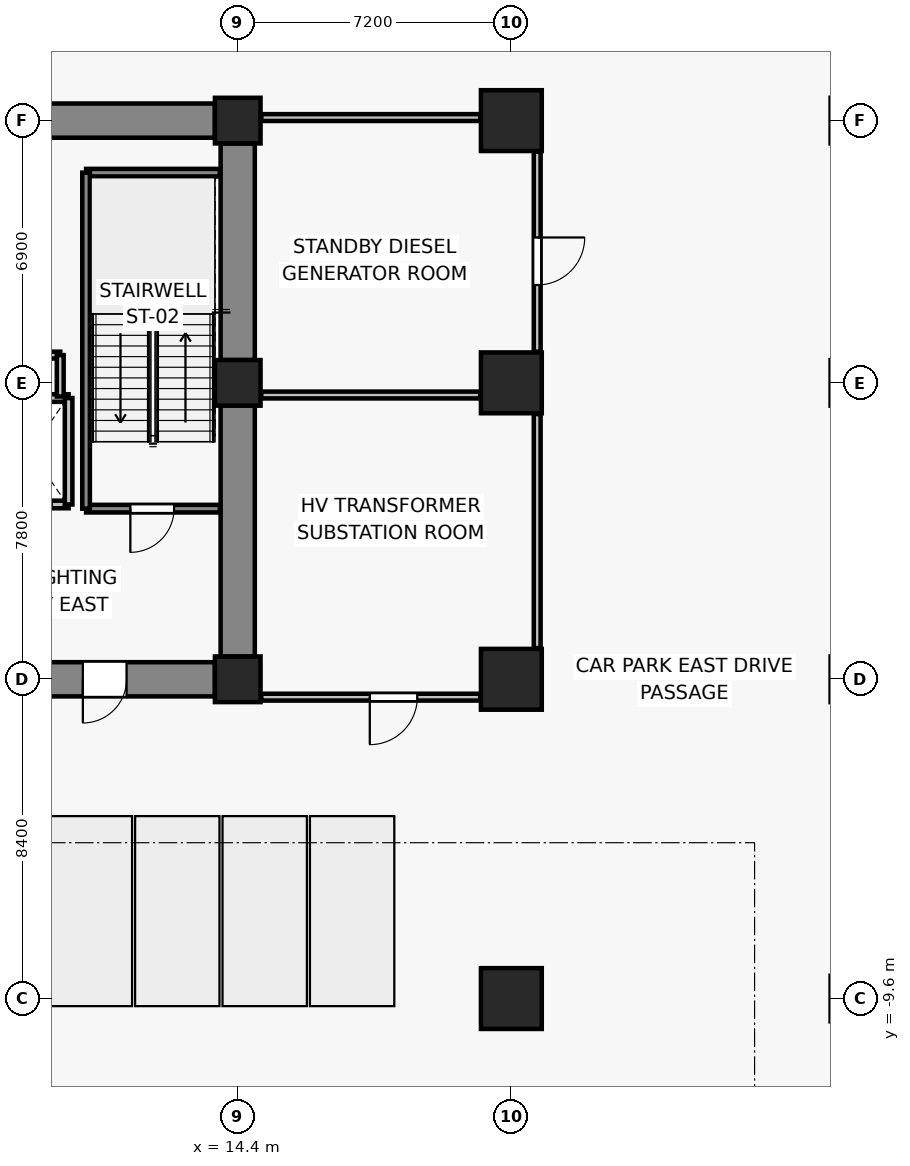
"""IFC4 building model, lengths in metres.
Left out: names, types, materials, properties, quantities, classifications, styles, units other than length and angle.
Written with IfcOpenShell. Run it as: python <this file> out.ifc"""

import sys

from ifc_helpers import new_model, si_unit, direction, frame, frame_2d, origin, origin_2d, place, context, subcontext, project, spatial, rectangle, extrude, source, transform, mapped, element, fill, save


model = new_model("IFC4")
c1 = context("Model", 3, precision=1e-05, world=origin(), true_north=direction((0.0, 1.0)))
c2 = subcontext(c1, "Body", "Model", "MODEL_VIEW")
j1 = project(units=[si_unit("LENGTHUNIT", "METRE"), si_unit("PLANEANGLEUNIT", "RADIAN")], contexts=[c1])
p1 = place(None, origin())
s1 = spatial("IfcSite", under=j1, at=p1, CompositionType="ELEMENT")
p2 = place(p1, origin())
s2 = spatial("IfcBuilding", under=s1, at=p2, CompositionType="ELEMENT")
p3 = place(p2, frame((0.0, 0.0, -8.8)))
s3 = spatial("IfcBuildingStorey", under=s2, at=p3, CompositionType="ELEMENT", Elevation=-8.8)
for number, where, z_axis, x_axis in (
    (1, (14.4, -1.2, 0.0), (0.0, 0.0, 1.0), (1.0, 0.0, 0.0)),
    (2, (14.4, 6.6, 0.0), (0.0, 0.0, 1.0), (1.0, 0.0, 0.0)),
    (3, (14.4, 13.5, 0.0), (0.0, 0.0, 1.0), (1.0, 0.0, 0.0)),
):
    element("IfcColumn", number, at=place(p3, frame(where, z_axis=z_axis, x_axis=x_axis)), inside=s3, PredefinedType="COLUMN", context=c2, shape_type="SweptSolid", body=[
        extrude(rectangle(XDim=1.2, YDim=1.2, at=origin_2d()), origin(), (0.0, 0.0, 1.0), 4.4),
    ])
for number, where, z_axis, x_axis in (
    (4, (21.6, -9.6, 0.0), (0.0, 0.0, 1.0), (1.0, 0.0, 0.0)),
    (5, (21.6, -1.2, 0.0), (0.0, 0.0, 1.0), (1.0, 0.0, 0.0)),
    (6, (21.6, 6.6, 0.0), (0.0, 0.0, 1.0), (1.0, 0.0, 0.0)),
    (7, (21.6, 13.5, 0.0), (0.0, 0.0, 1.0), (1.0, 0.0, 0.0)),
):
    element("IfcColumn", number, at=place(p3, frame(where, z_axis=z_axis, x_axis=x_axis)), inside=s3, PredefinedType="COLUMN", context=c2, shape_type="SweptSolid", body=[
        extrude(rectangle(XDim=1.6, YDim=1.6, at=origin_2d()), origin(), (0.0, 0.0, 1.0), 4.4),
    ])
p4 = place(p3, frame((7.8, 13.5, 0.0), z_axis=(0.0, 0.0, 1.0), x_axis=(1.0, 0.0, 0.0)))
e8 = element("IfcWall", 8, at=p4, inside=s3, PredefinedType="SHEAR", context=c2, shape_type="SweptSolid", body=[
    extrude(rectangle(XDim=6.0, YDim=0.9, at=frame_2d((3.0, 0.0))), origin(), (0.0, 0.0, 1.0), 4.12),
])
p5 = place(p3, frame((14.4, -0.6, 0.0), z_axis=(0.0, 0.0, 1.0), x_axis=(0.0, 1.0, 0.0)))
e9 = element("IfcWall", 9, at=p5, inside=s3, PredefinedType="SHEAR", context=c2, shape_type="SweptSolid", body=[
    extrude(rectangle(XDim=6.6, YDim=0.9, at=frame_2d((3.3, 0.0))), origin(), (0.0, 0.0, 1.0), 4.12),
])
p6 = place(p3, frame((14.4, 7.2, 0.0), z_axis=(0.0, 0.0, 1.0), x_axis=(0.0, 1.0, 0.0)))
e10 = element("IfcWall", 10, at=p6, inside=s3, PredefinedType="SHEAR", context=c2, shape_type="SweptSolid", body=[
    extrude(rectangle(XDim=5.7, YDim=0.9, at=frame_2d((2.85, 0.0))), origin(), (0.0, 0.0, 1.0), 4.12),
])
p7 = place(p3, frame((13.8, -1.2, 0.0), z_axis=(0.0, 0.0, 1.0), x_axis=(-1.0, 0.0, 0.0)))
e11 = element("IfcWall", 11, at=p7, inside=s3, PredefinedType="SHEAR", context=c2, shape_type="SweptSolid", body=[
    extrude(rectangle(XDim=6.0, YDim=0.9, at=frame_2d((3.0, 0.0))), origin(), (0.0, 0.0, 1.0), 4.12),
])
p8 = place(p7, frame((2.325, 0.0, 0.0)))
e12 = element("IfcOpeningElement", 12, at=p8, cuts=e11, PredefinedType="OPENING", context=c2, shape_type="SweptSolid", body=[
    extrude(rectangle(XDim=1.15, YDim=2.15, at=frame_2d((0.575, 1.075))), frame((0.0, 0.46, 0.0), z_axis=(0.0, -1.0, 0.0), x_axis=(1.0, 0.0, 0.0)), (0.0, 0.0, 1.0), 0.92),
])
p9 = place(p3, frame((9.95, 3.4, 0.0), z_axis=(0.0, 0.0, 1.0), x_axis=(-1.0, 0.0, 0.0)))
e13 = element("IfcWall", 13, at=p9, inside=s3, PredefinedType="SOLIDWALL", context=c2, shape_type="SweptSolid", body=[
    extrude(rectangle(XDim=2.0, YDim=0.2, at=frame_2d((1.0, 0.0))), origin(), (0.0, 0.0, 1.0), 4.12),
])
p10 = place(p9, frame((0.45, 0.0, 0.0)))
e14 = element("IfcOpeningElement", 14, at=p10, cuts=e13, PredefinedType="OPENING", context=c2, shape_type="SweptSolid", body=[
    extrude(rectangle(XDim=1.1, YDim=2.2, at=frame_2d((0.55, 1.1))), frame((0.0, 0.11, 0.0), z_axis=(0.0, -1.0, 0.0), x_axis=(1.0, 0.0, 0.0)), (0.0, 0.0, 1.0), 0.22),
])
p11 = place(p3, frame((7.95, 6.2, 0.0), z_axis=(0.0, 0.0, 1.0), x_axis=(1.0, 0.0, 0.0)))
e15 = element("IfcWall", 15, at=p11, inside=s3, PredefinedType="SOLIDWALL", context=c2, shape_type="SweptSolid", body=[
    extrude(rectangle(XDim=2.0, YDim=0.2, at=frame_2d((1.0, 0.0))), origin(), (0.0, 0.0, 1.0), 4.12),
])
p12 = place(p3, frame((9.95, 6.2, 0.0), z_axis=(0.0, 0.0, 1.0), x_axis=(0.0, -1.0, 0.0)))
e16 = element("IfcWall", 16, at=p12, inside=s3, PredefinedType="SOLIDWALL", context=c2, shape_type="SweptSolid", body=[
    extrude(rectangle(XDim=2.8, YDim=0.2, at=frame_2d((1.4, 0.0))), origin(), (0.0, 0.0, 1.0), 4.12),
])
p13 = place(p3, frame((13.93, 3.29, 0.0), z_axis=(0.0, 0.0, 1.0), x_axis=(-1.0, 0.0, 0.0)))
e17 = element("IfcWall", 17, at=p13, inside=s3, PredefinedType="SOLIDWALL", context=c2, shape_type="SweptSolid", body=[
    extrude(rectangle(XDim=3.52, YDim=0.2, at=frame_2d((1.76, 0.0))), origin(), (0.0, 0.0, 1.0), 4.12),
])
p14 = place(p13, frame((1.205, 0.0, 0.0)))
e18 = element("IfcOpeningElement", 18, at=p14, cuts=e17, PredefinedType="OPENING", context=c2, shape_type="SweptSolid", body=[
    extrude(rectangle(XDim=1.15, YDim=2.15, at=frame_2d((0.575, 1.075))), frame((0.0, 0.11, 0.0), z_axis=(0.0, -1.0, 0.0), x_axis=(1.0, 0.0, 0.0)), (0.0, 0.0, 1.0), 0.22),
])
p15 = place(p3, frame((10.41, 12.13, 0.0), z_axis=(0.0, 0.0, 1.0), x_axis=(1.0, 0.0, 0.0)))
e19 = element("IfcWall", 19, at=p15, inside=s3, PredefinedType="SOLIDWALL", context=c2, shape_type="SweptSolid", body=[
    extrude(rectangle(XDim=3.52, YDim=0.2, at=frame_2d((1.76, 0.0))), origin(), (0.0, 0.0, 1.0), 4.12),
])
p16 = place(p3, frame((10.41, 3.29, 0.0), z_axis=(0.0, 0.0, 1.0), x_axis=(0.0, 1.0, 0.0)))
e20 = element("IfcWall", 20, at=p16, inside=s3, PredefinedType="SOLIDWALL", context=c2, shape_type="SweptSolid", body=[
    extrude(rectangle(XDim=8.84, YDim=0.2, at=frame_2d((4.42, 0.0))), origin(), (0.0, 0.0, 1.0), 4.12),
])
p17 = place(p3, frame((7.47, 7.33, 0.0), z_axis=(0.0, 0.0, 1.0), x_axis=(1.0, 0.0, 0.0)))
e21 = element("IfcWall", 21, at=p17, inside=s3, PredefinedType="PARTITIONING", context=c2, shape_type="SweptSolid", body=[
    extrude(rectangle(XDim=2.26, YDim=0.18, at=frame_2d((1.13, 0.0))), origin(), (0.0, 0.0, 1.0), 3.41),
])
p18 = place(p17, frame((0.69, 0.0, 0.0)))
e22 = element("IfcOpeningElement", 22, at=p18, cuts=e21, PredefinedType="OPENING", context=c2, shape_type="SweptSolid", body=[
    extrude(rectangle(XDim=0.88, YDim=2.1, at=frame_2d((0.44, 1.05))), frame((0.0, 0.1, 0.0), z_axis=(0.0, -1.0, 0.0), x_axis=(1.0, 0.0, 0.0)), (0.0, 0.0, 1.0), 0.2),
])
p19 = place(p3, frame((9.73, 7.33, 0.0), z_axis=(0.0, 0.0, 1.0), x_axis=(0.0, -1.0, 0.0)))
e23 = element("IfcWall", 23, at=p19, inside=s3, PredefinedType="PARTITIONING", context=c2, shape_type="SweptSolid", body=[
    extrude(rectangle(XDim=1.09, YDim=0.18, at=frame_2d((0.545, 0.0))), origin(), (0.0, 0.0, 1.0), 4.12),
])
p20 = place(p3, frame((20.78, -1.67, 0.0), z_axis=(0.0, 0.0, 1.0), x_axis=(-1.0, 0.0, 0.0)))
e24 = element("IfcWall", 24, at=p20, inside=s3, PredefinedType="PARTITIONING", context=c2, shape_type="SweptSolid", body=[
    extrude(rectangle(XDim=5.76, YDim=0.18, at=frame_2d((2.88, 0.0))), origin(), (0.0, 0.0, 1.0), 4.12),
])
p21 = place(p20, frame((1.655, 0.0, 0.0)))
e25 = element("IfcOpeningElement", 25, at=p21, cuts=e24, PredefinedType="OPENING", context=c2, shape_type="SweptSolid", body=[
    extrude(rectangle(XDim=1.25, YDim=2.15, at=frame_2d((0.625, 1.075))), frame((0.0, 0.1, 0.0), z_axis=(0.0, -1.0, 0.0), x_axis=(1.0, 0.0, 0.0)), (0.0, 0.0, 1.0), 0.2),
])
p22 = place(p3, frame((15.02, 6.28, 0.0), z_axis=(0.0, 0.0, 1.0), x_axis=(1.0, 0.0, 0.0)))
e26 = element("IfcWall", 26, at=p22, inside=s3, PredefinedType="PARTITIONING", context=c2, shape_type="SweptSolid", body=[
    extrude(rectangle(XDim=5.76, YDim=0.18, at=frame_2d((2.88, 0.0))), origin(), (0.0, 0.0, 1.0), 4.12),
])
p23 = place(p3, frame((22.28, 5.78, 0.0), z_axis=(0.0, 0.0, 1.0), x_axis=(0.0, -1.0, 0.0)))
e27 = element("IfcWall", 27, at=p23, inside=s3, PredefinedType="PARTITIONING", context=c2, shape_type="SweptSolid", body=[
    extrude(rectangle(XDim=6.16, YDim=0.18, at=frame_2d((3.08, 0.0))), origin(), (0.0, 0.0, 1.0), 3.493),
])
p24 = place(p3, frame((15.02, 13.58, 0.0), z_axis=(0.0, 0.0, 1.0), x_axis=(1.0, 0.0, 0.0)))
e28 = element("IfcWall", 28, at=p24, inside=s3, PredefinedType="PARTITIONING", context=c2, shape_type="SweptSolid", body=[
    extrude(rectangle(XDim=5.76, YDim=0.18, at=frame_2d((2.88, 0.0))), origin(), (0.0, 0.0, 1.0), 3.41),
])
p25 = place(p3, frame((22.28, 12.68, 0.0), z_axis=(0.0, 0.0, 1.0), x_axis=(0.0, -1.0, 0.0)))
e29 = element("IfcWall", 29, at=p25, inside=s3, PredefinedType="PARTITIONING", context=c2, shape_type="SweptSolid", body=[
    extrude(rectangle(XDim=5.26, YDim=0.18, at=frame_2d((2.63, 0.0))), origin(), (0.0, 0.0, 1.0), 4.12),
])
p26 = place(p25, frame((2.255, 0.0, 0.0)))
e30 = element("IfcOpeningElement", 30, at=p26, cuts=e29, PredefinedType="OPENING", context=c2, shape_type="SweptSolid", body=[
    extrude(rectangle(XDim=1.25, YDim=2.15, at=frame_2d((0.625, 1.075))), frame((0.0, 0.1, 0.0), z_axis=(0.0, -1.0, 0.0), x_axis=(1.0, 0.0, 0.0)), (0.0, 0.0, 1.0), 0.2),
])
m1 = source(origin(), c2, "Body", "SweptSolid", [
    extrude(rectangle(XDim=1.15, YDim=2.15, at=frame_2d((0.575, 1.075))), frame((0.0, 0.025, 0.0), z_axis=(0.0, -1.0, 0.0), x_axis=(1.0, 0.0, 0.0)), (0.0, 0.0, 1.0), 0.05),
])
p27 = place(p14, origin())
e31 = element("IfcDoor", 31, at=p27, inside=s3, OperationType="SINGLE_SWING_RIGHT", PredefinedType="DOOR", context=c2, shape_type="MappedRepresentation", body=[
    mapped(m1, transform((0.0, 0.0, 0.0), x_axis=(1.0, 0.0, 0.0), y_axis=(0.0, 1.0, 0.0), z_axis=(0.0, 0.0, 1.0), scale=1.0)),
])
fill(e18, e31)
p28 = place(p8, origin())
e32 = element("IfcDoor", 32, at=p28, inside=s3, OperationType="SINGLE_SWING_RIGHT", PredefinedType="DOOR", context=c2, shape_type="MappedRepresentation", body=[
    mapped(m1, transform((0.0, 0.0, 0.0), x_axis=(1.0, 0.0, 0.0), y_axis=(0.0, 1.0, 0.0), z_axis=(0.0, 0.0, 1.0), scale=1.0)),
])
fill(e12, e32)
m2 = source(origin(), c2, "Body", "SweptSolid", [
    extrude(rectangle(XDim=1.25, YDim=2.15, at=frame_2d((0.625, 1.075))), frame((0.0, 0.025, 0.0), z_axis=(0.0, -1.0, 0.0), x_axis=(1.0, 0.0, 0.0)), (0.0, 0.0, 1.0), 0.05),
])
p29 = place(p21, origin())
e33 = element("IfcDoor", 33, at=p29, inside=s3, OperationType="SINGLE_SWING_RIGHT", PredefinedType="DOOR", context=c2, shape_type="MappedRepresentation", body=[
    mapped(m2, transform((0.0, 0.0, 0.0), x_axis=(1.0, 0.0, 0.0), y_axis=(0.0, 1.0, 0.0), z_axis=(0.0, 0.0, 1.0), scale=1.0)),
])
fill(e25, e33)
p30 = place(p26, origin())
e34 = element("IfcDoor", 34, at=p30, inside=s3, OperationType="SINGLE_SWING_LEFT", PredefinedType="DOOR", context=c2, shape_type="MappedRepresentation", body=[
    mapped(m2, transform((0.0, 0.0, 0.0), x_axis=(1.0, 0.0, 0.0), y_axis=(0.0, 1.0, 0.0), z_axis=(0.0, 0.0, 1.0), scale=1.0)),
])
fill(e30, e34)
save(model, sys.argv[1])
